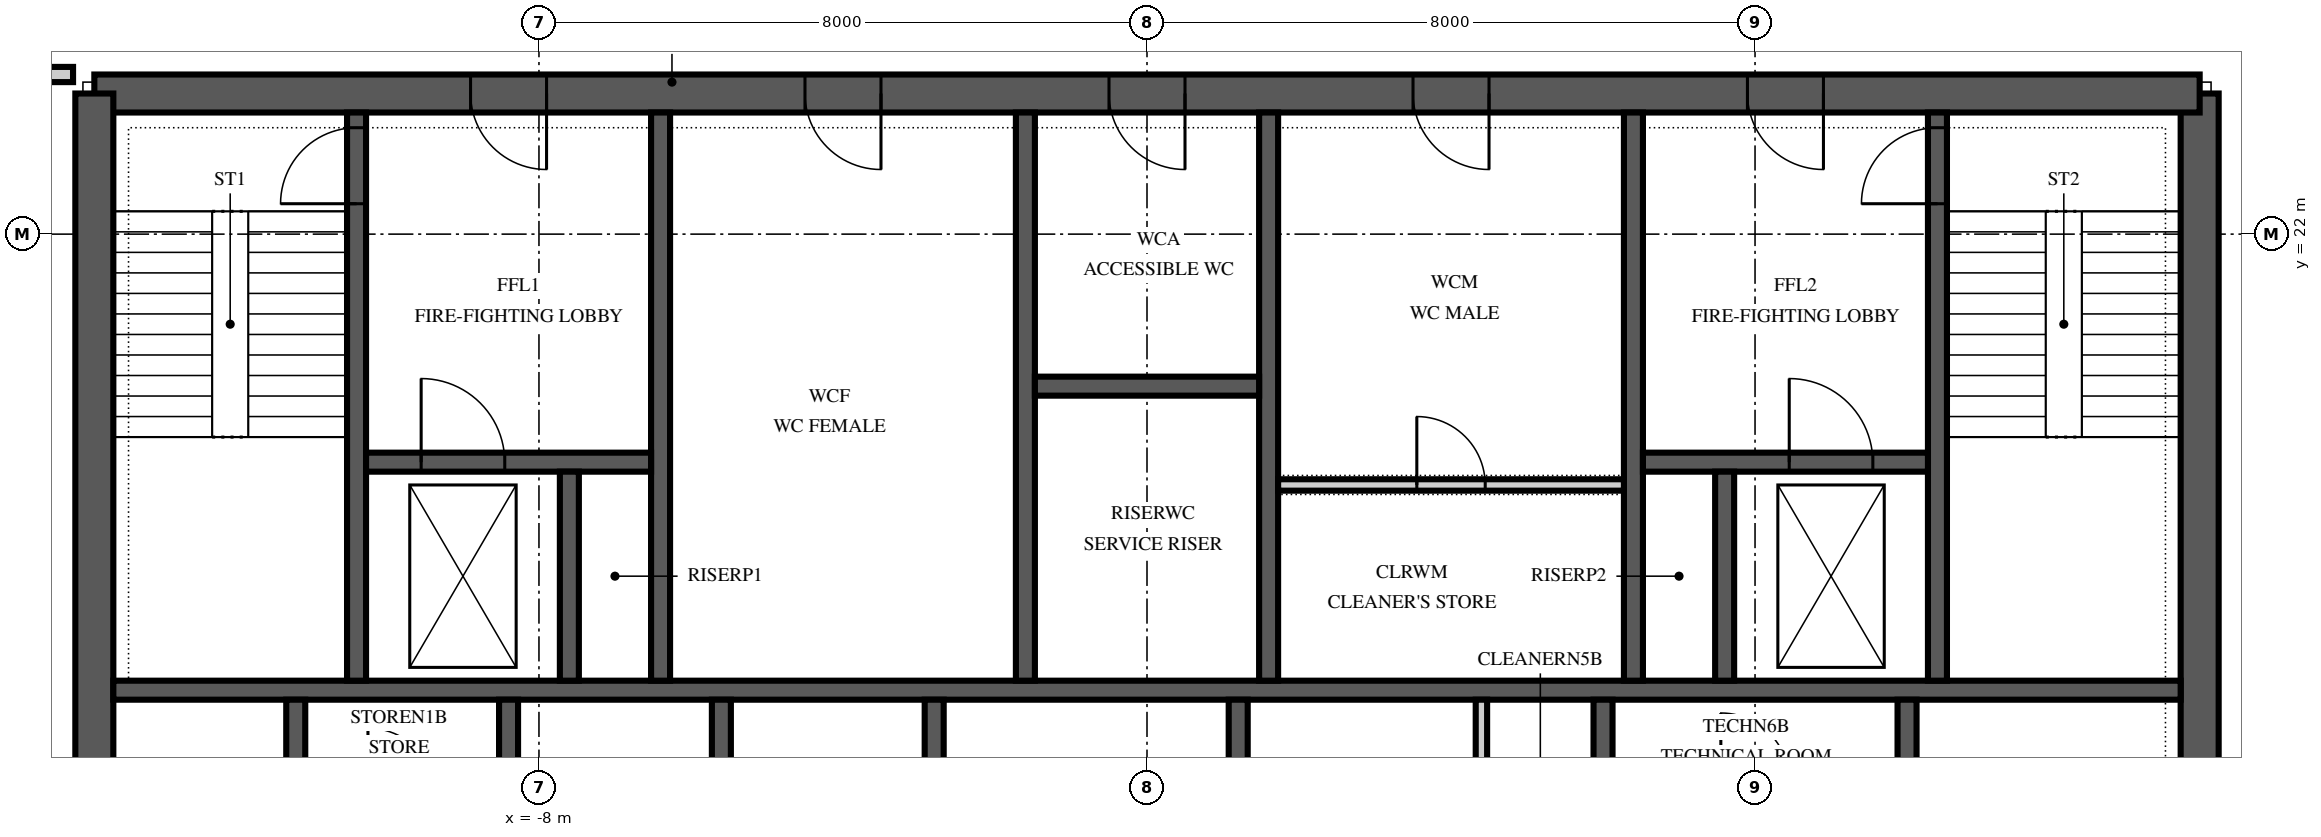
"""IFC4 building model, lengths in metres.
Left out: names, types, materials, properties, quantities, classifications, styles, units other than length and angle.
Written with IfcOpenShell. Run it as: python <this file> out.ifc"""

import sys

from ifc_helpers import new_model, si_unit, direction, frame, frame_2d, origin, place, context, subcontext, project, spatial, polyline, rectangle, outline, extrude, element, fill, save


model = new_model("IFC4")
c1 = context("Model", 3, precision=1e-05, world=origin(), true_north=direction((0.0, 1.0)))
c2 = subcontext(c1, "Body", "Model", "MODEL_VIEW")
j1 = project(units=[si_unit("LENGTHUNIT", "METRE"), si_unit("PLANEANGLEUNIT", "RADIAN")], contexts=[c1])
p1 = place(None, origin())
s1 = spatial("IfcSite", under=j1, at=p1, CompositionType="ELEMENT")
p2 = place(p1, origin())
s2 = spatial("IfcBuilding", under=s1, at=p2, CompositionType="ELEMENT")
p3 = place(p2, frame((0.0, 0.0, 312.0)))
s3 = spatial("IfcBuildingStorey", under=s2, at=p3, CompositionType="ELEMENT", Elevation=312.0)
p4 = place(p3, frame((13.85, 6.15, 0.0), z_axis=(0.0, 0.0, 1.0), x_axis=(0.0, 1.0, 0.0)))
e1 = element("IfcWall", 1, at=p4, inside=s3, PredefinedType="SHEAR", context=c2, shape_type="SweptSolid", body=[
    extrude(outline(polyline([(0.0, -0.25), (17.7, -0.25), (17.7, 0.0), (17.45, 0.0), (17.45, 0.25), (0.25, 0.25), (0.25, 0.0), (0.0, 0.0), (0.0, -0.25)])), origin(), (0.0, 0.0, 1.0), 4.0),
])
p5 = place(p4, frame((4.15, 0.0, 0.0)))
e2 = element("IfcOpeningElement", 2, at=p5, cuts=e1, PredefinedType="OPENING", context=c2, shape_type="SweptSolid", body=[
    extrude(rectangle(XDim=1.8, YDim=2.4, at=frame_2d((0.9, 1.2))), frame((0.0, 0.265, 0.0), z_axis=(0.0, -1.0, 0.0), x_axis=(1.0, 0.0, 0.0)), (0.0, 0.0, 1.0), 0.53),
])
p6 = place(p3, frame((13.85, 23.85, 0.0), z_axis=(0.0, 0.0, 1.0), x_axis=(-1.0, 0.0, 0.0)))
e3 = element("IfcWall", 3, at=p6, inside=s3, PredefinedType="SHEAR", context=c2, shape_type="SweptSolid", body=[
    extrude(rectangle(XDim=27.7, YDim=0.5, at=frame_2d((13.85, 0.0))), origin(), (0.0, 0.0, 1.0), 4.0),
])
p7 = place(p6, frame((21.75, 0.0, 0.0)))
e4 = element("IfcOpeningElement", 4, at=p7, cuts=e3, PredefinedType="OPENING", context=c2, shape_type="SweptSolid", body=[
    extrude(rectangle(XDim=1.0, YDim=2.1, at=frame_2d((0.5, 1.05))), frame((0.0, 0.265, 0.0), z_axis=(0.0, -1.0, 0.0), x_axis=(1.0, 0.0, 0.0)), (0.0, 0.0, 1.0), 0.53),
])
p8 = place(p6, frame((4.95, 0.0, 0.0)))
e5 = element("IfcOpeningElement", 5, at=p8, cuts=e3, PredefinedType="OPENING", context=c2, shape_type="SweptSolid", body=[
    extrude(rectangle(XDim=1.0, YDim=2.1, at=frame_2d((0.5, 1.05))), frame((0.0, 0.265, 0.0), z_axis=(0.0, -1.0, 0.0), x_axis=(1.0, 0.0, 0.0)), (0.0, 0.0, 1.0), 0.53),
])
p9 = place(p6, frame((17.35, 0.0, 0.0)))
e6 = element("IfcOpeningElement", 6, at=p9, cuts=e3, PredefinedType="OPENING", context=c2, shape_type="SweptSolid", body=[
    extrude(rectangle(XDim=1.0, YDim=2.1, at=frame_2d((0.5, 1.05))), frame((0.0, 0.265, 0.0), z_axis=(0.0, -1.0, 0.0), x_axis=(1.0, 0.0, 0.0)), (0.0, 0.0, 1.0), 0.53),
])
p10 = place(p6, frame((13.35, 0.0, 0.0)))
e7 = element("IfcOpeningElement", 7, at=p10, cuts=e3, PredefinedType="OPENING", context=c2, shape_type="SweptSolid", body=[
    extrude(rectangle(XDim=1.0, YDim=2.1, at=frame_2d((0.5, 1.05))), frame((0.0, 0.265, 0.0), z_axis=(0.0, -1.0, 0.0), x_axis=(1.0, 0.0, 0.0)), (0.0, 0.0, 1.0), 0.53),
])
p11 = place(p6, frame((9.35, 0.0, 0.0)))
e8 = element("IfcOpeningElement", 8, at=p11, cuts=e3, PredefinedType="OPENING", context=c2, shape_type="SweptSolid", body=[
    extrude(rectangle(XDim=1.0, YDim=2.1, at=frame_2d((0.5, 1.05))), frame((0.0, 0.265, 0.0), z_axis=(0.0, -1.0, 0.0), x_axis=(1.0, 0.0, 0.0)), (0.0, 0.0, 1.0), 0.53),
])
p12 = place(p3, frame((-13.85, 23.85, 0.0), z_axis=(0.0, 0.0, 1.0), x_axis=(0.0, -1.0, 0.0)))
e9 = element("IfcWall", 9, at=p12, inside=s3, PredefinedType="SHEAR", context=c2, shape_type="SweptSolid", body=[
    extrude(outline(polyline([(0.0, -0.25), (17.7, -0.25), (17.7, 0.0), (17.45, 0.0), (17.45, 0.25), (0.25, 0.25), (0.25, 0.0), (0.0, 0.0), (0.0, -0.25)])), origin(), (0.0, 0.0, 1.0), 4.0),
])
p13 = place(p12, frame((11.75, 0.0, 0.0)))
e10 = element("IfcOpeningElement", 10, at=p13, cuts=e9, PredefinedType="OPENING", context=c2, shape_type="SweptSolid", body=[
    extrude(rectangle(XDim=1.8, YDim=2.4, at=frame_2d((0.9, 1.2))), frame((0.0, 0.265, 0.0), z_axis=(0.0, -1.0, 0.0), x_axis=(1.0, 0.0, 0.0)), (0.0, 0.0, 1.0), 0.53),
])
p14 = place(p3, frame((-13.6, 16.0, 0.0), z_axis=(0.0, 0.0, 1.0), x_axis=(1.0, 0.0, 0.0)))
e11 = element("IfcWall", 11, at=p14, inside=s3, PredefinedType="SHEAR", context=c2, shape_type="SweptSolid", body=[
    extrude(rectangle(XDim=27.2, YDim=0.25, at=frame_2d((13.6, 0.0))), origin(), (0.0, 0.0, 1.0), 4.0),
])
for number, where, z_axis, x_axis in (
    (12, (-11.2, 13.125, 0.0), (0.0, 0.0, 1.0), (0.0, 1.0, 0.0)),
    (13, (-8.4, 13.125, 0.0), (0.0, 0.0, 1.0), (0.0, 1.0, 0.0)),
    (14, (-5.6, 13.125, 0.0), (0.0, 0.0, 1.0), (0.0, 1.0, 0.0)),
    (15, (-2.8, 13.125, 0.0), (0.0, 0.0, 1.0), (0.0, 1.0, 0.0)),
    (16, (1.2, 13.125, 0.0), (0.0, 0.0, 1.0), (0.0, 1.0, 0.0)),
    (17, (6.0, 13.125, 0.0), (0.0, 0.0, 1.0), (0.0, 1.0, 0.0)),
    (18, (10.0, 13.125, 0.0), (0.0, 0.0, 1.0), (0.0, 1.0, 0.0)),
):
    element("IfcWall", number, at=place(p3, frame(where, z_axis=z_axis, x_axis=x_axis)), inside=s3, PredefinedType="SHEAR", context=c2, shape_type="SweptSolid", body=[
        extrude(rectangle(XDim=2.75, YDim=0.25, at=frame_2d((1.375, 0.0))), origin(), (0.0, 0.0, 1.0), 4.0),
    ])
p15 = place(p3, frame((-10.4, 16.125, 0.0), z_axis=(0.0, 0.0, 1.0), x_axis=(0.0, 1.0, 0.0)))
e19 = element("IfcWall", 19, at=p15, inside=s3, PredefinedType="SHEAR", context=c2, shape_type="SweptSolid", body=[
    extrude(rectangle(XDim=7.475, YDim=0.25, at=frame_2d((3.738, 0.0))), origin(), (0.0, 0.0, 1.0), 4.0),
])
p16 = place(p15, frame((6.275, 0.0, 0.0)))
e20 = element("IfcOpeningElement", 20, at=p16, cuts=e19, PredefinedType="OPENING", context=c2, shape_type="SweptSolid", body=[
    extrude(rectangle(XDim=1.0, YDim=2.1, at=frame_2d((0.5, 1.05))), frame((0.0, 0.14, 0.0), z_axis=(0.0, -1.0, 0.0), x_axis=(1.0, 0.0, 0.0)), (0.0, 0.0, 1.0), 0.28),
])
for number, where, z_axis, x_axis in (
    (21, (-6.4, 16.125, 0.0), (0.0, 0.0, 1.0), (0.0, 1.0, 0.0)),
    (22, (-1.6, 16.125, 0.0), (0.0, 0.0, 1.0), (0.0, 1.0, 0.0)),
    (23, (1.6, 16.125, 0.0), (0.0, 0.0, 1.0), (0.0, 1.0, 0.0)),
    (24, (6.4, 16.125, 0.0), (0.0, 0.0, 1.0), (0.0, 1.0, 0.0)),
):
    element("IfcWall", number, at=place(p3, frame(where, z_axis=z_axis, x_axis=x_axis)), inside=s3, PredefinedType="SHEAR", context=c2, shape_type="SweptSolid", body=[
        extrude(rectangle(XDim=7.475, YDim=0.25, at=frame_2d((3.738, 0.0))), origin(), (0.0, 0.0, 1.0), 4.0),
    ])
p17 = place(p3, frame((10.4, 16.125, 0.0), z_axis=(0.0, 0.0, 1.0), x_axis=(0.0, 1.0, 0.0)))
e25 = element("IfcWall", 25, at=p17, inside=s3, PredefinedType="SHEAR", context=c2, shape_type="SweptSolid", body=[
    extrude(rectangle(XDim=7.475, YDim=0.25, at=frame_2d((3.738, 0.0))), origin(), (0.0, 0.0, 1.0), 4.0),
])
p18 = place(p17, frame((6.275, 0.0, 0.0)))
e26 = element("IfcOpeningElement", 26, at=p18, cuts=e25, PredefinedType="OPENING", context=c2, shape_type="SweptSolid", body=[
    extrude(rectangle(XDim=1.0, YDim=2.1, at=frame_2d((0.5, 1.05))), frame((0.0, 0.14, 0.0), z_axis=(0.0, -1.0, 0.0), x_axis=(1.0, 0.0, 0.0)), (0.0, 0.0, 1.0), 0.28),
])
p19 = place(p3, frame((-10.275, 19.0, 0.0), z_axis=(0.0, 0.0, 1.0), x_axis=(1.0, 0.0, 0.0)))
e27 = element("IfcWall", 27, at=p19, inside=s3, PredefinedType="SHEAR", context=c2, shape_type="SweptSolid", body=[
    extrude(rectangle(XDim=3.75, YDim=0.25, at=frame_2d((1.875, 0.0))), origin(), (0.0, 0.0, 1.0), 4.0),
])
p20 = place(p19, frame((0.725, 0.0, 0.0)))
e28 = element("IfcOpeningElement", 28, at=p20, cuts=e27, PredefinedType="OPENING", context=c2, shape_type="SweptSolid", body=[
    extrude(rectangle(XDim=1.1, YDim=2.1, at=frame_2d((0.55, 1.05))), frame((0.0, 0.14, 0.0), z_axis=(0.0, -1.0, 0.0), x_axis=(1.0, 0.0, 0.0)), (0.0, 0.0, 1.0), 0.28),
])
p21 = place(p3, frame((6.525, 19.0, 0.0), z_axis=(0.0, 0.0, 1.0), x_axis=(1.0, 0.0, 0.0)))
e29 = element("IfcWall", 29, at=p21, inside=s3, PredefinedType="SHEAR", context=c2, shape_type="SweptSolid", body=[
    extrude(rectangle(XDim=3.75, YDim=0.25, at=frame_2d((1.875, 0.0))), origin(), (0.0, 0.0, 1.0), 4.0),
])
p22 = place(p21, frame((1.925, 0.0, 0.0)))
e30 = element("IfcOpeningElement", 30, at=p22, cuts=e29, PredefinedType="OPENING", context=c2, shape_type="SweptSolid", body=[
    extrude(rectangle(XDim=1.1, YDim=2.1, at=frame_2d((0.55, 1.05))), frame((0.0, 0.14, 0.0), z_axis=(0.0, -1.0, 0.0), x_axis=(1.0, 0.0, 0.0)), (0.0, 0.0, 1.0), 0.28),
])
for number, where, z_axis, x_axis in (
    (31, (-7.6, 16.125, 0.0), (0.0, 0.0, 1.0), (0.0, 1.0, 0.0)),
    (32, (7.6, 16.125, 0.0), (0.0, 0.0, 1.0), (0.0, 1.0, 0.0)),
):
    element("IfcWall", number, at=place(p3, frame(where, z_axis=z_axis, x_axis=x_axis)), inside=s3, PredefinedType="SHEAR", context=c2, shape_type="SweptSolid", body=[
        extrude(rectangle(XDim=2.75, YDim=0.25, at=frame_2d((1.375, 0.0))), origin(), (0.0, 0.0, 1.0), 4.0),
    ])
p23 = place(p3, frame((-1.475, 20.0, 0.0), z_axis=(0.0, 0.0, 1.0), x_axis=(1.0, 0.0, 0.0)))
e33 = element("IfcWall", 33, at=p23, inside=s3, PredefinedType="SHEAR", context=c2, shape_type="SweptSolid", body=[
    extrude(rectangle(XDim=2.95, YDim=0.25, at=frame_2d((1.475, 0.0))), origin(), (0.0, 0.0, 1.0), 4.0),
])
p24 = place(p3, frame((1.725, 18.7, 0.0), z_axis=(0.0, 0.0, 1.0), x_axis=(1.0, 0.0, 0.0)))
e34 = element("IfcWall", 34, at=p24, inside=s3, PredefinedType="PARTITIONING", context=c2, shape_type="SweptSolid", body=[
    extrude(rectangle(XDim=4.55, YDim=0.15, at=frame_2d((2.275, 0.0))), origin(), (0.0, 0.0, 1.0), 3.85),
])
p25 = place(p24, frame((1.825, 0.0, 0.0)))
e35 = element("IfcOpeningElement", 35, at=p25, cuts=e34, PredefinedType="OPENING", context=c2, shape_type="SweptSolid", body=[
    extrude(rectangle(XDim=0.9, YDim=2.1, at=frame_2d((0.45, 1.05))), frame((0.0, 0.09, 0.0), z_axis=(0.0, -1.0, 0.0), x_axis=(1.0, 0.0, 0.0)), (0.0, 0.0, 1.0), 0.18),
])
p26 = place(p3, frame((4.4, 13.125, 0.0), z_axis=(0.0, 0.0, 1.0), x_axis=(0.0, 1.0, 0.0)))
e36 = element("IfcWall", 36, at=p26, inside=s3, PredefinedType="PARTITIONING", context=c2, shape_type="SweptSolid", body=[
    extrude(rectangle(XDim=2.75, YDim=0.15, at=frame_2d((1.375, 0.0))), origin(), (0.0, 0.0, 1.0), 3.85),
])
p27 = place(p3, frame((-16.15, 24.1, 0.0), z_axis=(0.0, 0.0, 1.0), x_axis=(1.0, 0.0, 0.0)))
e37 = element("IfcWall", 37, at=p27, inside=s3, PredefinedType="PARTITIONING", context=c2, shape_type="SweptSolid", body=[
    extrude(rectangle(XDim=2.02, YDim=0.2, at=frame_2d((1.01, 0.0))), origin(), (0.0, 0.0, 1.0), 3.418),
])
p28 = place(p27, frame((0.45, 0.0, 0.0)))
e38 = element("IfcOpeningElement", 38, at=p28, cuts=e37, PredefinedType="OPENING", context=c2, shape_type="SweptSolid", body=[
    extrude(rectangle(XDim=1.2, YDim=2.4, at=frame_2d((0.6, 1.2))), frame((0.0, 0.115, 0.0), z_axis=(0.0, -1.0, 0.0), x_axis=(1.0, 0.0, 0.0)), (0.0, 0.0, 1.0), 0.23),
])
p29 = place(p7, origin())
e39 = element("IfcDoor", 39, at=p29, inside=s3, OperationType="SINGLE_SWING_RIGHT", PredefinedType="DOOR", context=c2, shape_type="SweptSolid", body=[
    extrude(rectangle(XDim=1.0, YDim=2.1, at=frame_2d((0.5, 1.05))), frame((0.0, 0.25, 0.0), z_axis=(0.0, -1.0, 0.0), x_axis=(1.0, 0.0, 0.0)), (0.0, 0.0, 1.0), 0.5),
])
fill(e4, e39)
p30 = place(p8, origin())
e40 = element("IfcDoor", 40, at=p30, inside=s3, OperationType="SINGLE_SWING_RIGHT", PredefinedType="DOOR", context=c2, shape_type="SweptSolid", body=[
    extrude(rectangle(XDim=1.0, YDim=2.1, at=frame_2d((0.5, 1.05))), frame((0.0, 0.25, 0.0), z_axis=(0.0, -1.0, 0.0), x_axis=(1.0, 0.0, 0.0)), (0.0, 0.0, 1.0), 0.5),
])
fill(e5, e40)
p31 = place(p9, origin())
e41 = element("IfcDoor", 41, at=p31, inside=s3, OperationType="SINGLE_SWING_LEFT", PredefinedType="DOOR", context=c2, shape_type="SweptSolid", body=[
    extrude(rectangle(XDim=1.0, YDim=2.1, at=frame_2d((0.5, 1.05))), frame((0.0, 0.25, 0.0), z_axis=(0.0, -1.0, 0.0), x_axis=(1.0, 0.0, 0.0)), (0.0, 0.0, 1.0), 0.5),
])
fill(e6, e41)
p32 = place(p10, origin())
e42 = element("IfcDoor", 42, at=p32, inside=s3, OperationType="SINGLE_SWING_LEFT", PredefinedType="DOOR", context=c2, shape_type="SweptSolid", body=[
    extrude(rectangle(XDim=1.0, YDim=2.1, at=frame_2d((0.5, 1.05))), frame((0.0, 0.25, 0.0), z_axis=(0.0, -1.0, 0.0), x_axis=(1.0, 0.0, 0.0)), (0.0, 0.0, 1.0), 0.5),
])
fill(e7, e42)
p33 = place(p11, origin())
e43 = element("IfcDoor", 43, at=p33, inside=s3, OperationType="SINGLE_SWING_LEFT", PredefinedType="DOOR", context=c2, shape_type="SweptSolid", body=[
    extrude(rectangle(XDim=1.0, YDim=2.1, at=frame_2d((0.5, 1.05))), frame((0.0, 0.25, 0.0), z_axis=(0.0, -1.0, 0.0), x_axis=(1.0, 0.0, 0.0)), (0.0, 0.0, 1.0), 0.5),
])
fill(e8, e43)
p34 = place(p16, origin())
e44 = element("IfcDoor", 44, at=p34, inside=s3, OperationType="SINGLE_SWING_LEFT", PredefinedType="DOOR", context=c2, shape_type="SweptSolid", body=[
    extrude(rectangle(XDim=1.0, YDim=2.1, at=frame_2d((0.5, 1.05))), frame((0.0, 0.125, 0.0), z_axis=(0.0, -1.0, 0.0), x_axis=(1.0, 0.0, 0.0)), (0.0, 0.0, 1.0), 0.25),
])
fill(e20, e44)
p35 = place(p18, origin())
e45 = element("IfcDoor", 45, at=p35, inside=s3, OperationType="SINGLE_SWING_LEFT", PredefinedType="DOOR", context=c2, shape_type="SweptSolid", body=[
    extrude(rectangle(XDim=1.0, YDim=2.1, at=frame_2d((0.5, 1.05))), frame((0.0, 0.125, 0.0), z_axis=(0.0, -1.0, 0.0), x_axis=(1.0, 0.0, 0.0)), (0.0, 0.0, 1.0), 0.25),
])
fill(e26, e45)
p36 = place(p22, origin())
e46 = element("IfcDoor", 46, at=p36, inside=s3, OperationType="SLIDING_TO_RIGHT", PredefinedType="DOOR", context=c2, shape_type="SweptSolid", body=[
    extrude(rectangle(XDim=1.1, YDim=2.1, at=frame_2d((0.55, 1.05))), frame((0.0, 0.125, 0.0), z_axis=(0.0, -1.0, 0.0), x_axis=(1.0, 0.0, 0.0)), (0.0, 0.0, 1.0), 0.25),
])
fill(e30, e46)
p37 = place(p20, origin())
e47 = element("IfcDoor", 47, at=p37, inside=s3, OperationType="SLIDING_TO_RIGHT", PredefinedType="DOOR", context=c2, shape_type="SweptSolid", body=[
    extrude(rectangle(XDim=1.1, YDim=2.1, at=frame_2d((0.55, 1.05))), frame((0.0, 0.125, 0.0), z_axis=(0.0, -1.0, 0.0), x_axis=(1.0, 0.0, 0.0)), (0.0, 0.0, 1.0), 0.25),
])
fill(e28, e47)
p38 = place(p25, origin())
e48 = element("IfcDoor", 48, at=p38, inside=s3, OperationType="SINGLE_SWING_LEFT", PredefinedType="DOOR", context=c2, shape_type="SweptSolid", body=[
    extrude(rectangle(XDim=0.9, YDim=2.1, at=frame_2d((0.45, 1.05))), frame((0.0, 0.075, 0.0), z_axis=(0.0, -1.0, 0.0), x_axis=(1.0, 0.0, 0.0)), (0.0, 0.0, 1.0), 0.149),
])
fill(e35, e48)
save(model, sys.argv[1])
